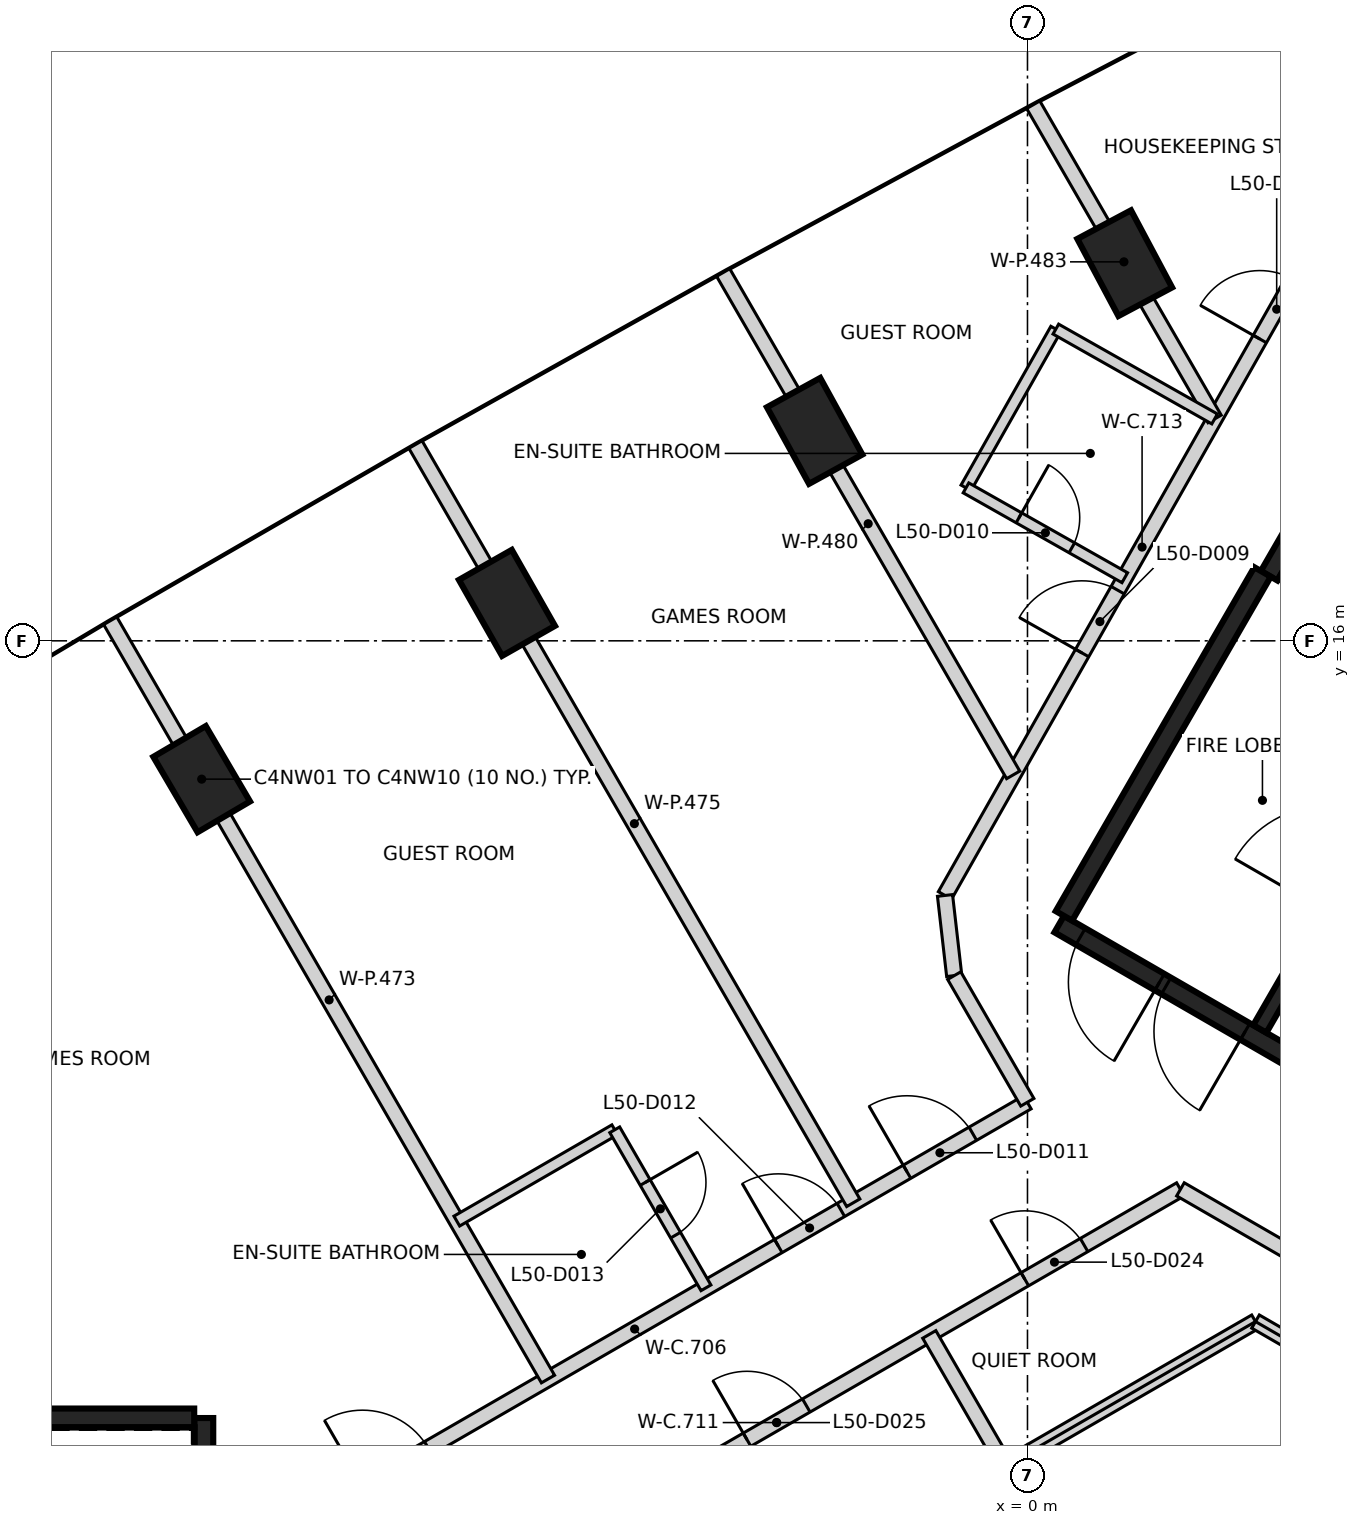
"""IFC4 building model, lengths in metres.
Left out: names, types, materials, properties, quantities, classifications, styles, units other than length and angle.
Written with IfcOpenShell. Run it as: python <this file> out.ifc"""

import sys

from ifc_helpers import new_model, si_unit, direction, frame, frame_2d, origin, origin_2d, place, context, subcontext, project, spatial, rectangle, extrude, element, fill, save


model = new_model("IFC4")
c1 = context("Model", 3, precision=1e-05, world=origin(), true_north=direction((0.0, 1.0)))
c2 = subcontext(c1, "Body", "Model", "MODEL_VIEW")
j1 = project(units=[si_unit("LENGTHUNIT", "METRE"), si_unit("PLANEANGLEUNIT", "RADIAN")], contexts=[c1])
p1 = place(None, origin())
s1 = spatial("IfcSite", under=j1, at=p1, CompositionType="ELEMENT")
p2 = place(p1, origin())
s2 = spatial("IfcBuilding", under=s1, at=p2, CompositionType="ELEMENT")
p3 = place(p2, frame((0.0, 0.0, 200.8)))
s3 = spatial("IfcBuildingStorey", under=s2, at=p3, CompositionType="ELEMENT", Elevation=200.8)
for number, where, z_axis, x_axis in (
    (1, (1.279, 20.968, -0.35), (0.0, 0.0, 1.0), (-0.47, 0.883, 0.0)),
    (2, (-2.8, 18.762, -0.35), (0.0, 0.0, 1.0), (-0.482, 0.876, 0.0)),
    (3, (-6.848, 16.499, -0.35), (0.0, 0.0, 1.0), (-0.494, 0.87, 0.0)),
    (4, (-10.864, 14.18, -0.35), (0.0, 0.0, 1.0), (-0.506, 0.862, 0.0)),
):
    element("IfcColumn", number, at=place(p3, frame(where, z_axis=z_axis, x_axis=x_axis)), inside=s3, PredefinedType="COLUMN", context=c2, shape_type="SweptSolid", body=[
        extrude(rectangle(XDim=1.15, YDim=0.8, at=origin_2d()), origin(), (0.0, 0.0, 1.0), 3.6),
    ])
p4 = place(p3, frame((-10.837, 5.775, 0.0), z_axis=(0.0, 0.0, 1.0), x_axis=(0.0, -1.0, 0.0)))
e5 = element("IfcWall", 5, at=p4, inside=s3, PredefinedType="SHEAR", context=c2, shape_type="SweptSolid", body=[
    extrude(rectangle(XDim=11.55, YDim=0.25, at=frame_2d((5.775, 0.0))), origin(), (0.0, 0.0, 1.0), 3.25),
])
p5 = place(p4, frame((10.025, 0.0, 0.0)))
e6 = element("IfcOpeningElement", 6, at=p5, cuts=e5, PredefinedType="OPENING", context=c2, shape_type="SweptSolid", body=[
    extrude(rectangle(XDim=1.2, YDim=2.1, at=frame_2d((0.6, 1.05))), frame((0.0, 0.135, 0.0), z_axis=(0.0, -1.0, 0.0), x_axis=(1.0, 0.0, 0.0)), (0.0, 0.0, 1.0), 0.27),
])
p6 = place(p4, frame((8.725, 0.0, 0.0)))
e7 = element("IfcOpeningElement", 7, at=p6, cuts=e5, PredefinedType="OPENING", context=c2, shape_type="SweptSolid", body=[
    extrude(rectangle(XDim=1.2, YDim=2.1, at=frame_2d((0.6, 1.05))), frame((0.0, 0.135, 0.0), z_axis=(0.0, -1.0, 0.0), x_axis=(1.0, 0.0, 0.0)), (0.0, 0.0, 1.0), 0.27),
])
p7 = place(p3, frame((-16.472, 5.775, 0.0), z_axis=(0.0, 0.0, 1.0), x_axis=(1.0, 0.0, 0.0)))
e8 = element("IfcWall", 8, at=p7, inside=s3, PredefinedType="SHEAR", context=c2, shape_type="SweptSolid", body=[
    extrude(rectangle(XDim=5.51, YDim=0.25, at=frame_2d((2.755, 0.0))), origin(), (0.0, 0.0, 1.0), 3.25),
])
p8 = place(p3, frame((10.42, 6.498, 0.0), z_axis=(0.0, 0.0, 1.0), x_axis=(-0.866021906294, 0.500006057782, 0.0)))
e9 = element("IfcWall", 9, at=p8, inside=s3, PredefinedType="SHEAR", context=c2, shape_type="SweptSolid", body=[
    extrude(rectangle(XDim=11.55, YDim=0.25, at=frame_2d((5.775, 0.0))), origin(), (0.0, 0.0, 1.0), 3.25),
])
p9 = place(p8, frame((10.025, 0.0, 0.0)))
e10 = element("IfcOpeningElement", 10, at=p9, cuts=e9, PredefinedType="OPENING", context=c2, shape_type="SweptSolid", body=[
    extrude(rectangle(XDim=1.2, YDim=2.1, at=frame_2d((0.6, 1.05))), frame((0.0, 0.135, 0.0), z_axis=(0.0, -1.0, 0.0), x_axis=(1.0, 0.0, 0.0)), (0.0, 0.0, 1.0), 0.27),
])
p10 = place(p8, frame((8.725, 0.0, 0.0)))
e11 = element("IfcOpeningElement", 11, at=p10, cuts=e9, PredefinedType="OPENING", context=c2, shape_type="SweptSolid", body=[
    extrude(rectangle(XDim=1.2, YDim=2.1, at=frame_2d((0.6, 1.05))), frame((0.0, 0.135, 0.0), z_axis=(0.0, -1.0, 0.0), x_axis=(1.0, 0.0, 0.0)), (0.0, 0.0, 1.0), 0.27),
])
p11 = place(p3, frame((3.179, 16.856, 0.0), z_axis=(0.0, 0.0, 1.0), x_axis=(0.500001955336, 0.866024274868, 0.0)))
e12 = element("IfcWall", 12, at=p11, inside=s3, PredefinedType="SHEAR", context=c2, shape_type="SweptSolid", body=[
    extrude(rectangle(XDim=6.125, YDim=0.25, at=frame_2d((3.062, 0.0))), origin(), (0.0, 0.0, 1.0), 3.25),
])
p12 = place(p11, frame((3.563, 0.0, 0.0)))
e13 = element("IfcOpeningElement", 13, at=p12, cuts=e12, PredefinedType="OPENING", context=c2, shape_type="SweptSolid", body=[
    extrude(rectangle(XDim=1.0, YDim=2.1, at=frame_2d((0.5, 1.05))), frame((0.0, 0.135, 0.0), z_axis=(0.0, -1.0, 0.0), x_axis=(1.0, 0.0, 0.0)), (0.0, 0.0, 1.0), 0.27),
])
p13 = place(p3, frame((0.48, 12.381, 0.0), z_axis=(0.0, 0.0, 1.0), x_axis=(0.49999885962, 0.866026062182, 0.0)))
e14 = element("IfcWall", 14, at=p13, inside=s3, PredefinedType="SHEAR", context=c2, shape_type="SweptSolid", body=[
    extrude(rectangle(XDim=5.225, YDim=0.25, at=frame_2d((2.612, 0.0))), origin(), (0.0, 0.0, 1.0), 3.25),
])
p14 = place(p3, frame((3.057, 10.895, 0.0), z_axis=(0.0, 0.0, 1.0), x_axis=(0.500027839223, 0.866009330205, 0.0)))
e15 = element("IfcWall", 15, at=p14, inside=s3, PredefinedType="SHEAR", context=c2, shape_type="SweptSolid", body=[
    extrude(rectangle(XDim=5.098, YDim=0.2, at=frame_2d((2.549, 0.0))), origin(), (0.0, 0.0, 1.0), 3.25),
])
p15 = place(p14, frame((1.774, 0.0, 0.0)))
e16 = element("IfcOpeningElement", 16, at=p15, cuts=e15, PredefinedType="OPENING", context=c2, shape_type="SweptSolid", body=[
    extrude(rectangle(XDim=1.4, YDim=2.1, at=frame_2d((0.7, 1.05))), frame((0.0, 0.11, 0.0), z_axis=(0.0, -1.0, 0.0), x_axis=(1.0, 0.0, 0.0)), (0.0, 0.0, 1.0), 0.22),
])
p16 = place(p3, frame((5.646, 15.576, 0.0), z_axis=(0.0, 0.0, 1.0), x_axis=(-0.866018407898, 0.500012117035, 0.0)))
e17 = element("IfcWall", 17, at=p16, inside=s3, PredefinedType="SHEAR", context=c2, shape_type="SweptSolid", body=[
    extrude(rectangle(XDim=2.651, YDim=0.2, at=frame_2d((1.325, 0.0))), origin(), (0.0, 0.0, 1.0), 3.25),
])
p17 = place(p16, frame((0.652, 0.0, 0.0)))
e18 = element("IfcOpeningElement", 18, at=p17, cuts=e17, PredefinedType="OPENING", context=c2, shape_type="SweptSolid", body=[
    extrude(rectangle(XDim=1.3, YDim=2.1, at=frame_2d((0.65, 1.05))), frame((0.0, 0.11, 0.0), z_axis=(0.0, -1.0, 0.0), x_axis=(1.0, 0.0, 0.0)), (0.0, 0.0, 1.0), 0.22),
])
p18 = place(p3, frame((-10.334, 3.963, 0.0), z_axis=(0.0, 0.0, 1.0), x_axis=(0.866013159114, 0.500021207791, 0.0)))
e19 = element("IfcWall", 19, at=p18, inside=s3, PredefinedType="PARTITIONING", context=c2, shape_type="SweptSolid", body=[
    extrude(rectangle(XDim=11.931, YDim=0.2, at=frame_2d((5.966, 0.0))), origin(), (0.0, 0.0, 1.0), 3.25),
])
p19 = place(p18, frame((10.103, 0.0, 0.0)))
e20 = element("IfcOpeningElement", 20, at=p19, cuts=e19, PredefinedType="OPENING", context=c2, shape_type="SweptSolid", body=[
    extrude(rectangle(XDim=1.0, YDim=2.1, at=frame_2d((0.5, 1.05))), frame((0.0, 0.11, 0.0), z_axis=(0.0, -1.0, 0.0), x_axis=(1.0, 0.0, 0.0)), (0.0, 0.0, 1.0), 0.22),
])
p20 = place(p18, frame((8.149, 0.0, 0.0)))
e21 = element("IfcOpeningElement", 21, at=p20, cuts=e19, PredefinedType="OPENING", context=c2, shape_type="SweptSolid", body=[
    extrude(rectangle(XDim=0.95, YDim=2.1, at=frame_2d((0.475, 1.05))), frame((0.0, 0.11, 0.0), z_axis=(0.0, -1.0, 0.0), x_axis=(1.0, 0.0, 0.0)), (0.0, 0.0, 1.0), 0.22),
])
p21 = place(p18, frame((1.831, 0.0, 0.0)))
e22 = element("IfcOpeningElement", 22, at=p21, cuts=e19, PredefinedType="OPENING", context=c2, shape_type="SweptSolid", body=[
    extrude(rectangle(XDim=1.0, YDim=2.1, at=frame_2d((0.5, 1.05))), frame((0.0, 0.11, 0.0), z_axis=(0.0, -1.0, 0.0), x_axis=(1.0, 0.0, 0.0)), (0.0, 0.0, 1.0), 0.22),
])
p22 = place(p3, frame((-8.611, 2.648, 0.0), z_axis=(0.0, 0.0, 1.0), x_axis=(0.865953566425, 0.500124405319, 0.0)))
e23 = element("IfcWall", 23, at=p22, inside=s3, PredefinedType="PARTITIONING", context=c2, shape_type="SweptSolid", body=[
    extrude(rectangle(XDim=12.267, YDim=0.2, at=frame_2d((6.134, 0.0))), origin(), (0.0, 0.0, 1.0), 3.25),
])
p23 = place(p22, frame((9.904, 0.0, 0.0)))
e24 = element("IfcOpeningElement", 24, at=p23, cuts=e23, PredefinedType="OPENING", context=c2, shape_type="SweptSolid", body=[
    extrude(rectangle(XDim=0.9, YDim=2.1, at=frame_2d((0.45, 1.05))), frame((0.0, 0.11, 0.0), z_axis=(0.0, -1.0, 0.0), x_axis=(1.0, 0.0, 0.0)), (0.0, 0.0, 1.0), 0.22),
])
p24 = place(p22, frame((5.683, 0.0, 0.0)))
e25 = element("IfcOpeningElement", 25, at=p24, cuts=e23, PredefinedType="OPENING", context=c2, shape_type="SweptSolid", body=[
    extrude(rectangle(XDim=0.9, YDim=2.1, at=frame_2d((0.45, 1.05))), frame((0.0, 0.11, 0.0), z_axis=(0.0, -1.0, 0.0), x_axis=(1.0, 0.0, 0.0)), (0.0, 0.0, 1.0), 0.22),
])
p25 = place(p22, frame((1.463, 0.0, 0.0)))
e26 = element("IfcOpeningElement", 26, at=p25, cuts=e23, PredefinedType="OPENING", context=c2, shape_type="SweptSolid", body=[
    extrude(rectangle(XDim=0.9, YDim=2.1, at=frame_2d((0.45, 1.05))), frame((0.0, 0.11, 0.0), z_axis=(0.0, -1.0, 0.0), x_axis=(1.0, 0.0, 0.0)), (0.0, 0.0, 1.0), 0.22),
])
p26 = place(p3, frame((-1.086, 12.65, 0.0), z_axis=(0.0, 0.0, 1.0), x_axis=(0.492507119433, 0.870308415051, 0.0)))
e27 = element("IfcWall", 27, at=p26, inside=s3, PredefinedType="PARTITIONING", context=c2, shape_type="SweptSolid", body=[
    extrude(rectangle(XDim=10.531, YDim=0.2, at=frame_2d((5.266, 0.0))), origin(), (0.0, 0.0, 1.0), 3.25),
])
p27 = place(p26, frame((8.411, 0.0, 0.0)))
e28 = element("IfcOpeningElement", 28, at=p27, cuts=e27, PredefinedType="OPENING", context=c2, shape_type="SweptSolid", body=[
    extrude(rectangle(XDim=0.9, YDim=2.1, at=frame_2d((0.45, 1.05))), frame((0.0, 0.11, 0.0), z_axis=(0.0, -1.0, 0.0), x_axis=(1.0, 0.0, 0.0)), (0.0, 0.0, 1.0), 0.22),
])
p28 = place(p26, frame((3.664, 0.0, 0.0)))
e29 = element("IfcOpeningElement", 29, at=p28, cuts=e27, PredefinedType="OPENING", context=c2, shape_type="SweptSolid", body=[
    extrude(rectangle(XDim=0.95, YDim=2.1, at=frame_2d((0.475, 1.05))), frame((0.0, 0.11, 0.0), z_axis=(0.0, -1.0, 0.0), x_axis=(1.0, 0.0, 0.0)), (0.0, 0.0, 1.0), 0.22),
])
p29 = place(p3, frame((-1.085, 12.65, 0.0), z_axis=(0.0, 0.0, 1.0), x_axis=(0.113812454263, -0.993502252264, 0.0)))
e30 = element("IfcWall", 30, at=p29, inside=s3, PredefinedType="PARTITIONING", context=c2, shape_type="SweptSolid", body=[
    extrude(rectangle(XDim=1.062, YDim=0.2, at=frame_2d((0.531, 0.0))), origin(), (0.0, 0.0, 1.0), 3.25),
])
p30 = place(p3, frame((-0.964, 11.595, 0.0), z_axis=(0.0, 0.0, 1.0), x_axis=(0.500110566207, -0.865961558944, 0.0)))
e31 = element("IfcWall", 31, at=p30, inside=s3, PredefinedType="PARTITIONING", context=c2, shape_type="SweptSolid", body=[
    extrude(rectangle(XDim=1.924, YDim=0.2, at=frame_2d((0.962, 0.0))), origin(), (0.0, 0.0, 1.0), 3.25),
])
p31 = place(p3, frame((2.012, 8.784, 0.0), z_axis=(0.0, 0.0, 1.0), x_axis=(0.865934186891, -0.500157959022, 0.0)))
e32 = element("IfcWall", 32, at=p31, inside=s3, PredefinedType="PARTITIONING", context=c2, shape_type="SweptSolid", body=[
    extrude(rectangle(XDim=1.666, YDim=0.2, at=frame_2d((0.833, 0.0))), origin(), (0.0, 0.0, 1.0), 3.25),
])
for number, where, z_axis, x_axis in (
    (33, (-12.067, 16.263, 0.0), (0.0, 0.0, 1.0), (0.5, -0.866, 0.0)),
    (34, (-8.052, 18.582, 0.0), (0.0, 0.0, 1.0), (0.5, -0.866, 0.0)),
):
    element("IfcWall", number, at=place(p3, frame(where, z_axis=z_axis, x_axis=x_axis)), inside=s3, PredefinedType="PARTITIONING", context=c2, shape_type="SweptSolid", body=[
        extrude(rectangle(XDim=11.519, YDim=0.2, at=frame_2d((5.759, 0.0))), origin(), (0.0, 0.0, 1.0), 3.25),
    ])
p32 = place(p3, frame((-7.599, 0.923, 0.0), z_axis=(0.0, 0.0, 1.0), x_axis=(0.865957029593, 0.500118408877, 0.0)))
e35 = element("IfcWall", 35, at=p32, inside=s3, PredefinedType="PARTITIONING", context=c2, shape_type="SweptSolid", body=[
    extrude(rectangle(XDim=12.24, YDim=0.2, at=frame_2d((6.12, 0.0))), origin(), (0.0, 0.0, 1.0), 3.25),
])
p33 = place(p3, frame((-4.004, 20.845, 0.0), z_axis=(0.0, 0.0, 1.0), x_axis=(0.500003076341, -0.866023627651, 0.0)))
e36 = element("IfcWall", 36, at=p33, inside=s3, PredefinedType="PARTITIONING", context=c2, shape_type="SweptSolid", body=[
    extrude(rectangle(XDim=7.631, YDim=0.2, at=frame_2d((3.816, 0.0))), origin(), (0.0, 0.0, 1.0), 3.25),
])
p34 = place(p3, frame((-1.292, 6.875, 0.0), z_axis=(0.0, 0.0, 1.0), x_axis=(0.50002537861, -0.866010750942, 0.0)))
e37 = element("IfcWall", 37, at=p34, inside=s3, PredefinedType="PARTITIONING", context=c2, shape_type="SweptSolid", body=[
    extrude(rectangle(XDim=2.0, YDim=0.2, at=frame_2d((1.0, 0.0))), origin(), (0.0, 0.0, 1.0), 3.25),
])
p35 = place(p3, frame((0.076, 23.052, 0.0), z_axis=(0.0, 0.0, 1.0), x_axis=(0.499957131376, -0.866050152581, 0.0)))
e38 = element("IfcWall", 38, at=p35, inside=s3, PredefinedType="PARTITIONING", context=c2, shape_type="SweptSolid", body=[
    extrude(rectangle(XDim=4.773, YDim=0.2, at=frame_2d((2.386, 0.0))), origin(), (0.0, 0.0, 1.0), 3.25),
])
p36 = place(p3, frame((3.0, 7.044, 0.0), z_axis=(0.0, 0.0, 1.0), x_axis=(0.865875248522, -0.500259986404, 0.0)))
e39 = element("IfcWall", 39, at=p36, inside=s3, PredefinedType="PARTITIONING", context=c2, shape_type="SweptSolid", body=[
    extrude(rectangle(XDim=1.848, YDim=0.2, at=frame_2d((0.924, 0.0))), origin(), (0.0, 0.0, 1.0), 3.25),
])
p37 = place(p3, frame((-7.508, 8.366, 0.0), z_axis=(0.0, 0.0, 1.0), x_axis=(0.865822967017, 0.500350466959, 0.0)))
e40 = element("IfcWall", 40, at=p37, inside=s3, PredefinedType="PARTITIONING", context=c2, shape_type="SweptSolid", body=[
    extrude(rectangle(XDim=2.4, YDim=0.15, at=frame_2d((1.2, 0.0))), origin(), (0.0, 0.0, 1.0), 3.25),
])
p38 = place(p3, frame((-5.43, 9.567, 0.0), z_axis=(0.0, 0.0, 1.0), x_axis=(0.499913221443, -0.866075499611, 0.0)))
e41 = element("IfcWall", 41, at=p38, inside=s3, PredefinedType="PARTITIONING", context=c2, shape_type="SweptSolid", body=[
    extrude(rectangle(XDim=2.4, YDim=0.15, at=frame_2d((1.2, 0.0))), origin(), (0.0, 0.0, 1.0), 3.25),
])
p39 = place(p38, frame((0.801, 0.0, 0.0)))
e42 = element("IfcOpeningElement", 42, at=p39, cuts=e41, PredefinedType="OPENING", context=c2, shape_type="SweptSolid", body=[
    extrude(rectangle(XDim=0.8, YDim=2.1, at=frame_2d((0.4, 1.05))), frame((0.0, 0.085, 0.0), z_axis=(0.0, -1.0, 0.0), x_axis=(1.0, 0.0, 0.0)), (0.0, 0.0, 1.0), 0.17),
])
p40 = place(p3, frame((-0.809, 18.012, 0.0), z_axis=(0.0, 0.0, 1.0), x_axis=(0.492476131012, 0.870325950655, 0.0)))
e43 = element("IfcWall", 43, at=p40, inside=s3, PredefinedType="PARTITIONING", context=c2, shape_type="SweptSolid", body=[
    extrude(rectangle(XDim=2.4, YDim=0.15, at=frame_2d((1.2, 0.0))), origin(), (0.0, 0.0, 1.0), 3.25),
])
p41 = place(p3, frame((-0.809, 18.012, 0.0), z_axis=(0.0, 0.0, 1.0), x_axis=(0.870369543509, -0.492399083806, 0.0)))
e44 = element("IfcWall", 44, at=p41, inside=s3, PredefinedType="PARTITIONING", context=c2, shape_type="SweptSolid", body=[
    extrude(rectangle(XDim=2.4, YDim=0.15, at=frame_2d((1.2, 0.0))), origin(), (0.0, 0.0, 1.0), 3.25),
])
p42 = place(p41, frame((0.8, 0.0, 0.0)))
e45 = element("IfcOpeningElement", 45, at=p42, cuts=e44, PredefinedType="OPENING", context=c2, shape_type="SweptSolid", body=[
    extrude(rectangle(XDim=0.8, YDim=2.1, at=frame_2d((0.4, 1.05))), frame((0.0, 0.085, 0.0), z_axis=(0.0, -1.0, 0.0), x_axis=(1.0, 0.0, 0.0)), (0.0, 0.0, 1.0), 0.17),
])
p43 = place(p3, frame((0.373, 20.101, 0.0), z_axis=(0.0, 0.0, 1.0), x_axis=(0.870301279559, -0.492519728334, 0.0)))
e46 = element("IfcWall", 46, at=p43, inside=s3, PredefinedType="PARTITIONING", context=c2, shape_type="SweptSolid", body=[
    extrude(rectangle(XDim=2.4, YDim=0.15, at=frame_2d((1.2, 0.0))), origin(), (0.0, 0.0, 1.0), 3.25),
])
p44 = place(p9, origin())
e47 = element("IfcDoor", 47, at=p44, inside=s3, OperationType="SINGLE_SWING_LEFT", PredefinedType="DOOR", context=c2, shape_type="SweptSolid", body=[
    extrude(rectangle(XDim=1.2, YDim=2.1, at=frame_2d((0.6, 1.05))), frame((0.0, 0.025, 0.0), z_axis=(0.0, -1.0, 0.0), x_axis=(1.0, 0.0, 0.0)), (0.0, 0.0, 1.0), 0.05),
])
fill(e10, e47)
p45 = place(p10, origin())
e48 = element("IfcDoor", 48, at=p45, inside=s3, OperationType="SINGLE_SWING_RIGHT", PredefinedType="DOOR", context=c2, shape_type="SweptSolid", body=[
    extrude(rectangle(XDim=1.2, YDim=2.1, at=frame_2d((0.6, 1.05))), frame((0.0, 0.025, 0.0), z_axis=(0.0, -1.0, 0.0), x_axis=(1.0, 0.0, 0.0)), (0.0, 0.0, 1.0), 0.05),
])
fill(e11, e48)
p46 = place(p27, origin())
e49 = element("IfcDoor", 49, at=p46, inside=s3, OperationType="SINGLE_SWING_LEFT", PredefinedType="DOOR", context=c2, shape_type="SweptSolid", body=[
    extrude(rectangle(XDim=0.9, YDim=2.1, at=frame_2d((0.45, 1.05))), frame((0.0, 0.025, 0.0), z_axis=(0.0, -1.0, 0.0), x_axis=(1.0, 0.0, 0.0)), (0.0, 0.0, 1.0), 0.05),
])
fill(e28, e49)
p47 = place(p28, origin())
e50 = element("IfcDoor", 50, at=p47, inside=s3, OperationType="SINGLE_SWING_LEFT", PredefinedType="DOOR", context=c2, shape_type="SweptSolid", body=[
    extrude(rectangle(XDim=0.95, YDim=2.1, at=frame_2d((0.475, 1.05))), frame((0.0, 0.025, 0.0), z_axis=(0.0, -1.0, 0.0), x_axis=(1.0, 0.0, 0.0)), (0.0, 0.0, 1.0), 0.05),
])
fill(e29, e50)
p48 = place(p42, origin())
e51 = element("IfcDoor", 51, at=p48, inside=s3, OperationType="SINGLE_SWING_LEFT", PredefinedType="DOOR", context=c2, shape_type="SweptSolid", body=[
    extrude(rectangle(XDim=0.8, YDim=2.1, at=frame_2d((0.4, 1.05))), frame((0.0, 0.025, 0.0), z_axis=(0.0, -1.0, 0.0), x_axis=(1.0, 0.0, 0.0)), (0.0, 0.0, 1.0), 0.05),
])
fill(e45, e51)
p49 = place(p19, origin())
e52 = element("IfcDoor", 52, at=p49, inside=s3, OperationType="SINGLE_SWING_LEFT", PredefinedType="DOOR", context=c2, shape_type="SweptSolid", body=[
    extrude(rectangle(XDim=1.0, YDim=2.1, at=frame_2d((0.5, 1.05))), frame((0.0, 0.025, 0.0), z_axis=(0.0, -1.0, 0.0), x_axis=(1.0, 0.0, 0.0)), (0.0, 0.0, 1.0), 0.05),
])
fill(e20, e52)
p50 = place(p20, origin())
e53 = element("IfcDoor", 53, at=p50, inside=s3, OperationType="SINGLE_SWING_LEFT", PredefinedType="DOOR", context=c2, shape_type="SweptSolid", body=[
    extrude(rectangle(XDim=0.95, YDim=2.1, at=frame_2d((0.475, 1.05))), frame((0.0, 0.025, 0.0), z_axis=(0.0, -1.0, 0.0), x_axis=(1.0, 0.0, 0.0)), (0.0, 0.0, 1.0), 0.05),
])
fill(e21, e53)
p51 = place(p39, frame((0.8, 0.0, 0.0), z_axis=(0.0, 0.0, 1.0), x_axis=(-1.0, 0.0, 0.0)))
e54 = element("IfcDoor", 54, at=p51, inside=s3, OperationType="SINGLE_SWING_LEFT", PredefinedType="DOOR", context=c2, shape_type="SweptSolid", body=[
    extrude(rectangle(XDim=0.8, YDim=2.1, at=frame_2d((0.4, 1.05))), frame((0.0, 0.025, 0.0), z_axis=(0.0, -1.0, 0.0), x_axis=(1.0, 0.0, 0.0)), (0.0, 0.0, 1.0), 0.05),
])
fill(e42, e54)
p52 = place(p23, frame((0.9, 0.0, 0.0), z_axis=(0.0, 0.0, 1.0), x_axis=(-1.0, 0.0, 0.0)))
e55 = element("IfcDoor", 55, at=p52, inside=s3, OperationType="SINGLE_SWING_LEFT", PredefinedType="DOOR", context=c2, shape_type="SweptSolid", body=[
    extrude(rectangle(XDim=0.9, YDim=2.1, at=frame_2d((0.45, 1.05))), frame((0.0, 0.025, 0.0), z_axis=(0.0, -1.0, 0.0), x_axis=(1.0, 0.0, 0.0)), (0.0, 0.0, 1.0), 0.05),
])
fill(e24, e55)
p53 = place(p24, frame((0.9, 0.0, 0.0), z_axis=(0.0, 0.0, 1.0), x_axis=(-1.0, 0.0, 0.0)))
e56 = element("IfcDoor", 56, at=p53, inside=s3, OperationType="SINGLE_SWING_LEFT", PredefinedType="DOOR", context=c2, shape_type="SweptSolid", body=[
    extrude(rectangle(XDim=0.9, YDim=2.1, at=frame_2d((0.45, 1.05))), frame((0.0, 0.025, 0.0), z_axis=(0.0, -1.0, 0.0), x_axis=(1.0, 0.0, 0.0)), (0.0, 0.0, 1.0), 0.05),
])
fill(e25, e56)
save(model, sys.argv[1])
